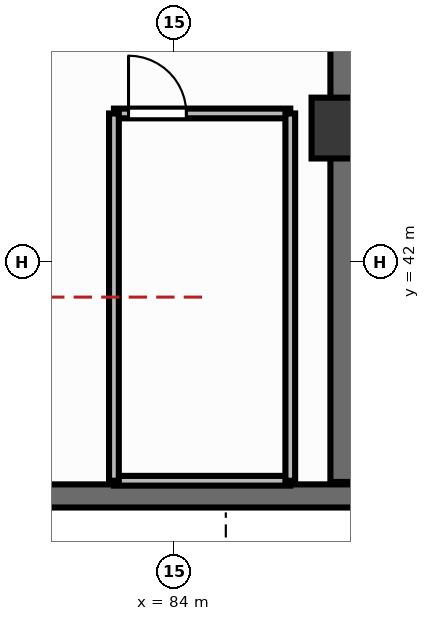
"""IFC4 building model, lengths in metres.
Left out: names, types, materials, properties, quantities, classifications, styles, units other than length and angle.
Written with IfcOpenShell. Run it as: python <this file> out.ifc"""

import sys

from ifc_helpers import new_model, si_unit, direction, frame, frame_2d, origin, origin_2d, place, context, subcontext, project, spatial, rectangle, extrude, element, fill, save


model = new_model("IFC4")
c1 = context("Model", 3, precision=1e-05, world=origin(), true_north=direction((0.0, 1.0)))
c2 = subcontext(c1, "Body", "Model", "MODEL_VIEW")
j1 = project(units=[si_unit("LENGTHUNIT", "METRE"), si_unit("PLANEANGLEUNIT", "RADIAN")], contexts=[c1])
p1 = place(None, origin())
s1 = spatial("IfcSite", under=j1, at=p1, CompositionType="ELEMENT")
p2 = place(p1, origin())
s2 = spatial("IfcBuilding", under=s1, at=p2, CompositionType="ELEMENT")
p3 = place(p2, frame((0.0, 0.0, 10.2)))
s3 = spatial("IfcBuildingStorey", under=s2, at=p3, CompositionType="ELEMENT", Elevation=10.2)
p4 = place(p3, frame((86.75, 44.2, 0.0), z_axis=(0.0, 0.0, 1.0), x_axis=(1.0, 0.0, 0.0)))
e1 = element("IfcColumn", 1, at=p4, inside=s3, PredefinedType="COLUMN", context=c2, shape_type="SweptSolid", body=[
    extrude(rectangle(XDim=1.0, YDim=1.0, at=origin_2d()), origin(), (0.0, 0.0, 1.0), 4.5),
])
p5 = place(p3, frame((86.75, 38.38, 0.0), z_axis=(0.0, 0.0, 1.0), x_axis=(0.0, 1.0, 0.0)))
e2 = element("IfcWall", 2, at=p5, inside=s3, PredefinedType="SHEAR", context=c2, shape_type="SweptSolid", body=[
    extrude(rectangle(XDim=8.41, YDim=0.38, at=frame_2d((4.205, 0.0))), origin(), (0.0, 0.0, 1.0), 4.5),
])
p6 = place(p3, frame((76.4, 38.15, 0.0), z_axis=(0.0, 0.0, 1.0), x_axis=(1.0, 0.0, 0.0)))
e3 = element("IfcWall", 3, at=p6, inside=s3, PredefinedType="SHEAR", context=c2, shape_type="SweptSolid", body=[
    extrude(rectangle(XDim=15.75, YDim=0.38, at=frame_2d((7.875, 0.0))), origin(), (0.0, 0.0, 1.0), 4.5),
])
p7 = place(p3, frame((83.0, 44.44, 0.0), z_axis=(0.0, 0.0, 1.0), x_axis=(1.0, 0.0, 0.0)))
e4 = element("IfcWall", 4, at=p7, inside=s3, PredefinedType="PARTITIONING", context=c2, shape_type="SweptSolid", body=[
    extrude(rectangle(XDim=2.9, YDim=0.16, at=frame_2d((1.45, 0.0))), origin(), (0.0, 0.0, 1.0), 3.46),
])
p8 = place(p7, frame((0.24, 0.0, 0.0)))
e5 = element("IfcOpeningElement", 5, at=p8, cuts=e4, PredefinedType="OPENING", context=c2, shape_type="SweptSolid", body=[
    extrude(rectangle(XDim=0.95, YDim=2.15, at=frame_2d((0.475, 1.075))), frame((0.0, 0.095, 0.0), z_axis=(0.0, -1.0, 0.0), x_axis=(1.0, 0.0, 0.0)), (0.0, 0.0, 1.0), 0.19),
])
p9 = place(p3, frame((85.9, 38.4, 0.0), z_axis=(0.0, 0.0, 1.0), x_axis=(-1.0, 0.0, 0.0)))
e6 = element("IfcWall", 6, at=p9, inside=s3, PredefinedType="PARTITIONING", context=c2, shape_type="SweptSolid", body=[
    extrude(rectangle(XDim=2.9, YDim=0.16, at=frame_2d((1.45, 0.0))), origin(), (0.0, 0.0, 1.0), 3.46),
])
for number, where, z_axis, x_axis in (
    (7, (83.0, 38.4, 0.0), (0.0, 0.0, 1.0), (0.0, 1.0, 0.0)),
    (8, (85.9, 44.44, 0.0), (0.0, 0.0, 1.0), (0.0, -1.0, 0.0)),
):
    element("IfcWall", number, at=place(p3, frame(where, z_axis=z_axis, x_axis=x_axis)), inside=s3, PredefinedType="PARTITIONING", context=c2, shape_type="SweptSolid", body=[
        extrude(rectangle(XDim=6.04, YDim=0.16, at=frame_2d((3.02, 0.0))), origin(), (0.0, 0.0, 1.0), 3.46),
    ])
p10 = place(p8, origin())
e9 = element("IfcDoor", 9, at=p10, inside=s3, OperationType="SINGLE_SWING_LEFT", PredefinedType="DOOR", context=c2, shape_type="SweptSolid", body=[
    extrude(rectangle(XDim=0.95, YDim=2.15, at=frame_2d((0.475, 1.075))), frame((0.0, 0.025, 0.0), z_axis=(0.0, -1.0, 0.0), x_axis=(1.0, 0.0, 0.0)), (0.0, 0.0, 1.0), 0.05),
])
fill(e5, e9)
save(model, sys.argv[1])
